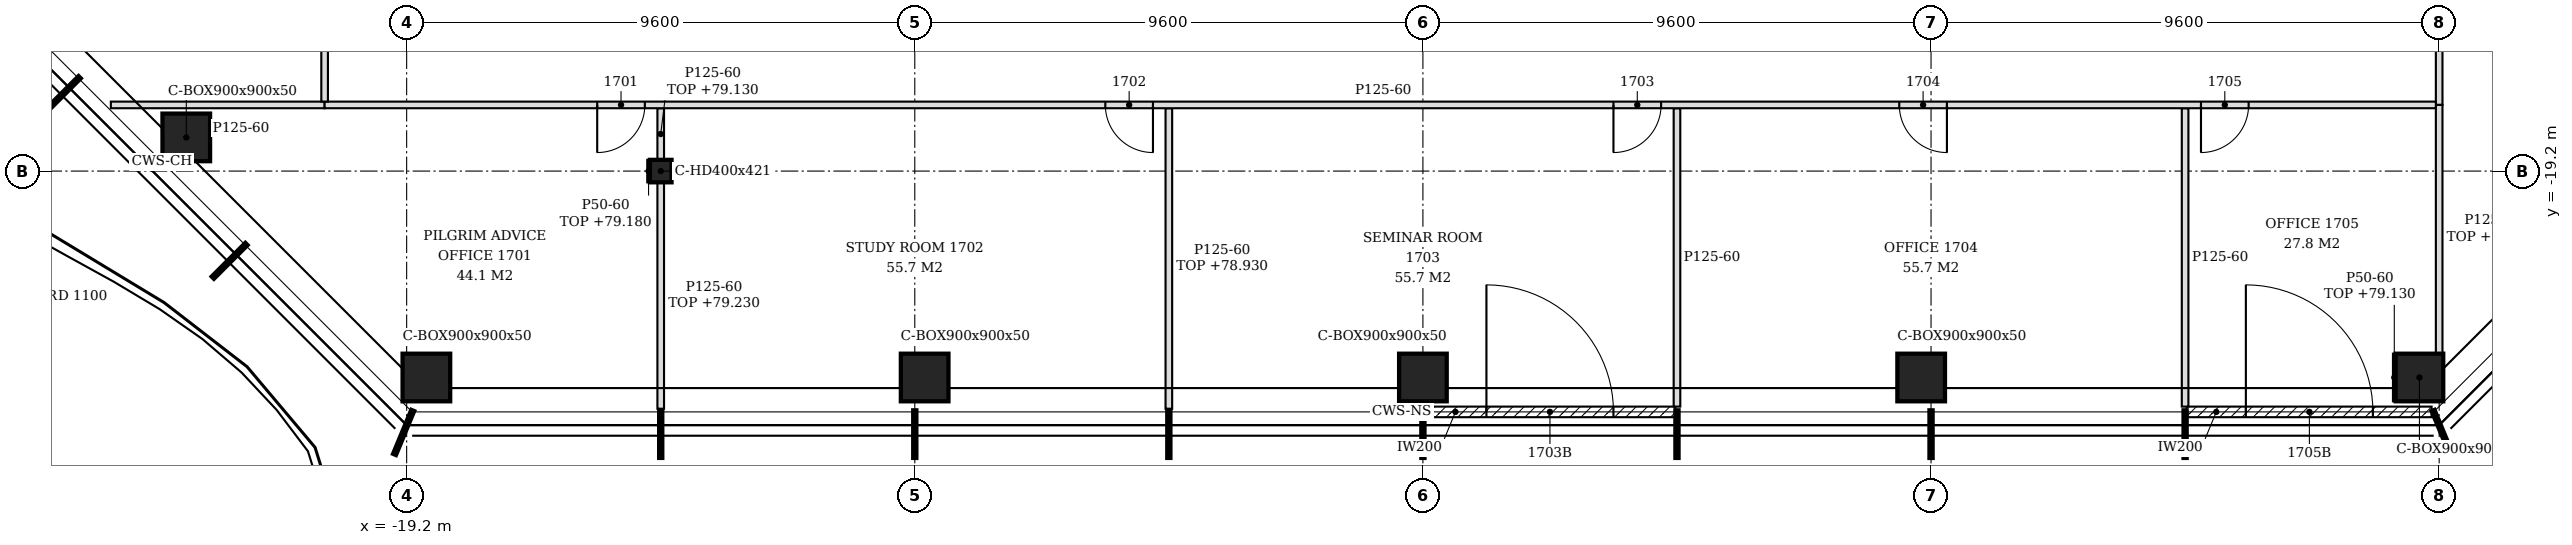
"""IFC4 building model, lengths in metres.
Left out: names, types, materials, properties, quantities, classifications, styles, units other than length and angle.
Written with IfcOpenShell. Run it as: python <this file> out.ifc"""

import sys

from ifc_helpers import new_model, si_unit, direction, frame, frame_2d, origin, origin_2d, place, context, subcontext, project, spatial, polyline, rectangle, hollow_rectangle, i_section, outline, extrude, element, fill, save


model = new_model("IFC4")
c1 = context("Model", 3, precision=1e-05, world=origin(), true_north=direction((0.0, 1.0)))
c2 = subcontext(c1, "Body", "Model", "MODEL_VIEW")
j1 = project(units=[si_unit("LENGTHUNIT", "METRE"), si_unit("PLANEANGLEUNIT", "RADIAN")], contexts=[c1])
p1 = place(None, origin())
s1 = spatial("IfcSite", under=j1, at=p1, CompositionType="ELEMENT")
p2 = place(p1, origin())
s2 = spatial("IfcBuilding", under=s1, at=p2, CompositionType="ELEMENT")
p3 = place(p2, frame((0.0, 0.0, 76.2)))
s3 = spatial("IfcBuildingStorey", under=s2, at=p3, CompositionType="ELEMENT", Elevation=76.2)
for number, where, z_axis, x_axis in (
    (1, (-18.827, -23.1, -0.15), (0.0, 0.0, 1.0), (1.0, 0.0, 0.0)),
    (2, (-9.414, -23.1, -0.15), (0.0, 0.0, 1.0), (1.0, 0.0, 0.0)),
    (3, (0.0, -23.1, -0.15), (0.0, 0.0, 1.0), (1.0, 0.0, 0.0)),
    (4, (9.414, -23.1, -0.15), (0.0, 0.0, 1.0), (1.0, 0.0, 0.0)),
    (5, (18.827, -23.1, -0.15), (0.0, 0.0, 1.0), (1.0, 0.0, 0.0)),
    (6, (-23.364, -18.564, -0.15), (0.0, 0.0, 1.0), (1.0, 0.0, 0.0)),
):
    element("IfcColumn", number, at=place(p3, frame(where, z_axis=z_axis, x_axis=x_axis)), inside=s3, PredefinedType="COLUMN", context=c2, shape_type="SweptSolid", body=[
        extrude(hollow_rectangle(XDim=0.9, YDim=0.9, WallThickness=0.05, at=origin_2d()), origin(), (0.0, 0.0, 1.0), 3.6),
    ])
p4 = place(p3, frame((-14.4, -19.2, -0.15), z_axis=(0.0, 0.0, 1.0), x_axis=(1.0, 0.0, 0.0)))
e7 = element("IfcColumn", 7, at=p4, inside=s3, PredefinedType="COLUMN", context=c2, shape_type="SweptSolid", body=[
    extrude(i_section(OverallWidth=0.409, OverallDepth=0.425, WebThickness=0.033, FlangeThickness=0.052, FilletRadius=0.015, at=origin_2d()), origin(), (0.0, 0.0, 1.0), 3.6),
])
p5 = place(p3, frame((0.03, -23.75, 0.0), z_axis=(0.0, 0.0, 1.0), x_axis=(1.0, 0.0, 0.0)))
e8 = element("IfcWall", 8, at=p5, inside=s3, PredefinedType="NOTDEFINED", context=c2, shape_type="SweptSolid", body=[
    extrude(rectangle(XDim=4.74, YDim=0.2, at=frame_2d((2.37, 0.0))), origin(), (0.0, 0.0, 1.0), 3.45),
])
p6 = place(p5, frame((1.17, 0.0, 0.0)))
e9 = element("IfcOpeningElement", 9, at=p6, cuts=e8, PredefinedType="OPENING", context=c2, shape_type="SweptSolid", body=[
    extrude(rectangle(XDim=2.4, YDim=2.4, at=frame_2d((1.2, 1.2))), frame((0.0, 0.11, 0.0), z_axis=(0.0, -1.0, 0.0), x_axis=(1.0, 0.0, 0.0)), (0.0, 0.0, 1.0), 0.22),
])
p7 = place(p3, frame((14.43, -23.75, 0.0), z_axis=(0.0, 0.0, 1.0), x_axis=(1.0, 0.0, 0.0)))
e10 = element("IfcWall", 10, at=p7, inside=s3, PredefinedType="NOTDEFINED", context=c2, shape_type="SweptSolid", body=[
    extrude(rectangle(XDim=4.626, YDim=0.2, at=frame_2d((2.313, 0.0))), origin(), (0.0, 0.0, 1.0), 3.45),
])
p8 = place(p7, frame((1.118, 0.0, 0.0)))
e11 = element("IfcOpeningElement", 11, at=p8, cuts=e10, PredefinedType="OPENING", context=c2, shape_type="SweptSolid", body=[
    extrude(rectangle(XDim=2.4, YDim=2.4, at=frame_2d((1.2, 1.2))), frame((0.0, 0.11, 0.0), z_axis=(0.0, -1.0, 0.0), x_axis=(1.0, 0.0, 0.0)), (0.0, 0.0, 1.0), 0.22),
])
p9 = place(p3, frame((-14.4, -23.69, 0.0), z_axis=(0.0, 0.0, 1.0), x_axis=(0.0, 1.0, 0.0)))
e12 = element("IfcWall", 12, at=p9, inside=s3, PredefinedType="PARTITIONING", context=c2, shape_type="SweptSolid", body=[
    extrude(outline(polyline([(0.0, 0.0), (4.277, 0.0), (4.278, 3.03), (0.74, 3.03), (0.738, 2.93), (0.44, 2.93), (0.438, 3.03), (0.0, 3.03), (0.0, 0.0)])), frame((0.0, 0.062, 0.0), z_axis=(0.0, -1.0, 0.0), x_axis=(1.0, 0.0, 0.0)), (0.0, 0.0, 1.0), 0.125),
])
p10 = place(p3, frame((-4.8, -23.69, 0.0), z_axis=(0.0, 0.0, 1.0), x_axis=(0.0, 1.0, 0.0)))
e13 = element("IfcWall", 13, at=p10, inside=s3, PredefinedType="PARTITIONING", context=c2, shape_type="SweptSolid", body=[
    extrude(rectangle(XDim=5.677, YDim=0.125, at=frame_2d((2.839, 0.0))), origin(), (0.0, 0.0, 1.0), 2.73),
])
for number, where, z_axis, x_axis in (
    (14, (4.8, -23.65, 0.0), (0.0, 0.0, 1.0), (0.0, 1.0, 0.0)),
    (15, (14.4, -23.65, 0.0), (0.0, 0.0, 1.0), (0.0, 1.0, 0.0)),
):
    element("IfcWall", number, at=place(p3, frame(where, z_axis=z_axis, x_axis=x_axis)), inside=s3, PredefinedType="PARTITIONING", context=c2, shape_type="SweptSolid", body=[
        extrude(outline(polyline([(0.0, 0.0), (5.637, 0.0), (5.637, 3.45), (4.555, 3.45), (4.553, 2.88), (4.345, 2.88), (4.343, 3.45), (0.7, 3.45), (0.698, 2.93), (0.4, 2.93), (0.398, 3.45), (0.0, 3.45), (0.0, 0.0)])), frame((0.0, 0.062, 0.0), z_axis=(0.0, -1.0, 0.0), x_axis=(1.0, 0.0, 0.0)), (0.0, 0.0, 1.0), 0.125),
    ])
p11 = place(p3, frame((19.2, -22.65, 0.0), z_axis=(0.0, 0.0, 1.0), x_axis=(0.0, 1.0, 0.0)))
e16 = element("IfcWall", 16, at=p11, inside=s3, PredefinedType="PARTITIONING", context=c2, shape_type="SweptSolid", body=[
    extrude(outline(polyline([(0.0, 0.0), (4.7, 0.0), (4.7, 2.73), (0.48, 2.73), (0.478, 2.63), (0.0, 2.63), (0.0, 0.0)])), frame((0.0, 0.062, 0.0), z_axis=(0.0, -1.0, 0.0), x_axis=(1.0, 0.0, 0.0)), (0.0, 0.0, 1.0), 0.125),
])
p12 = place(p3, frame((-14.4, -18.988, 0.0), z_axis=(0.0, 0.0, 1.0), x_axis=(0.0, 1.0, 0.0)))
e17 = element("IfcWall", 17, at=p12, inside=s3, PredefinedType="PARTITIONING", context=c2, shape_type="SweptSolid", body=[
    extrude(rectangle(XDim=0.975, YDim=0.125, at=frame_2d((0.488, 0.0))), origin(), (0.0, 0.0, 1.0), 2.93),
])
p13 = place(p3, frame((-24.789, -17.95, 0.0), z_axis=(0.0, 0.0, 1.0), x_axis=(1.0, 0.0, 0.0)))
e18 = element("IfcWall", 18, at=p13, inside=s3, PredefinedType="PARTITIONING", context=c2, shape_type="SweptSolid", body=[
    extrude(outline(polyline([(0.0, 0.0), (4.039, 0.0), (4.039, 3.45), (1.086, 3.45), (1.084, 2.93), (0.537, 2.93), (0.535, 3.45), (0.0, 3.45), (0.0, 0.0)])), frame((0.0, 0.062, 0.0), z_axis=(0.0, -1.0, 0.0), x_axis=(1.0, 0.0, 0.0)), (0.0, 0.0, 1.0), 0.125),
])
p14 = place(p3, frame((-20.75, -17.95, 0.0), z_axis=(0.0, 0.0, 1.0), x_axis=(1.0, 0.0, 0.0)))
e19 = element("IfcWall", 19, at=p14, inside=s3, PredefinedType="PARTITIONING", context=c2, shape_type="SweptSolid", body=[
    extrude(outline(polyline([(0.0, 0.0), (39.887, 0.0), (39.887, 2.73), (39.8, 2.73), (39.798, 3.45), (28.1, 3.45), (28.098, 2.73), (27.8, 2.73), (27.798, 3.45), (16.1, 3.45), (16.098, 2.73), (15.8, 2.73), (15.798, 3.45), (6.5, 3.45), (6.498, 2.93), (6.2, 2.93), (6.198, 3.45), (0.0, 3.45), (0.0, 0.0)])), frame((0.0, 0.062, 0.0), z_axis=(0.0, -1.0, 0.0), x_axis=(1.0, 0.0, 0.0)), (0.0, 0.0, 1.0), 0.125),
])
p15 = place(p14, frame((5.15, 0.0, 0.0)))
e20 = element("IfcOpeningElement", 20, at=p15, cuts=e19, PredefinedType="OPENING", context=c2, shape_type="SweptSolid", body=[
    extrude(rectangle(XDim=0.9, YDim=2.1, at=frame_2d((0.45, 1.05))), frame((0.0, 0.073, 0.0), z_axis=(0.0, -1.0, 0.0), x_axis=(1.0, 0.0, 0.0)), (0.0, 0.0, 1.0), 0.145),
])
p16 = place(p14, frame((14.75, 0.0, 0.0)))
e21 = element("IfcOpeningElement", 21, at=p16, cuts=e19, PredefinedType="OPENING", context=c2, shape_type="SweptSolid", body=[
    extrude(rectangle(XDim=0.9, YDim=2.1, at=frame_2d((0.45, 1.05))), frame((0.0, 0.073, 0.0), z_axis=(0.0, -1.0, 0.0), x_axis=(1.0, 0.0, 0.0)), (0.0, 0.0, 1.0), 0.145),
])
p17 = place(p14, frame((24.35, 0.0, 0.0)))
e22 = element("IfcOpeningElement", 22, at=p17, cuts=e19, PredefinedType="OPENING", context=c2, shape_type="SweptSolid", body=[
    extrude(rectangle(XDim=0.9, YDim=2.1, at=frame_2d((0.45, 1.05))), frame((0.0, 0.073, 0.0), z_axis=(0.0, -1.0, 0.0), x_axis=(1.0, 0.0, 0.0)), (0.0, 0.0, 1.0), 0.145),
])
p18 = place(p14, frame((29.75, 0.0, 0.0)))
e23 = element("IfcOpeningElement", 23, at=p18, cuts=e19, PredefinedType="OPENING", context=c2, shape_type="SweptSolid", body=[
    extrude(rectangle(XDim=0.9, YDim=2.1, at=frame_2d((0.45, 1.05))), frame((0.0, 0.073, 0.0), z_axis=(0.0, -1.0, 0.0), x_axis=(1.0, 0.0, 0.0)), (0.0, 0.0, 1.0), 0.145),
])
p19 = place(p14, frame((35.45, 0.0, 0.0)))
e24 = element("IfcOpeningElement", 24, at=p19, cuts=e19, PredefinedType="OPENING", context=c2, shape_type="SweptSolid", body=[
    extrude(rectangle(XDim=0.9, YDim=2.1, at=frame_2d((0.45, 1.05))), frame((0.0, 0.073, 0.0), z_axis=(0.0, -1.0, 0.0), x_axis=(1.0, 0.0, 0.0)), (0.0, 0.0, 1.0), 0.145),
])
p20 = place(p3, frame((-20.75, -17.887, 0.0), z_axis=(0.0, 0.0, 1.0), x_axis=(0.0, 1.0, 0.0)))
e25 = element("IfcWall", 25, at=p20, inside=s3, PredefinedType="PARTITIONING", context=c2, shape_type="SweptSolid", body=[
    extrude(outline(polyline([(0.0, 0.0), (39.876, 0.0), (39.876, 3.45), (39.622, 3.45), (39.62, 2.63), (38.507, 2.63), (38.505, 3.45), (37.183, 3.45), (37.18, 2.98), (36.992, 2.98), (36.99, 3.45), (32.397, 3.45), (32.396, 2.83), (32.177, 2.83), (32.176, 3.45), (27.597, 3.45), (27.595, 2.83), (27.377, 2.83), (27.375, 3.45), (22.798, 3.45), (22.795, 2.83), (22.577, 2.83), (22.575, 3.45), (17.998, 3.45), (17.996, 2.83), (17.778, 2.83), (17.775, 3.45), (13.198, 3.45), (13.196, 2.83), (12.978, 2.83), (12.976, 3.45), (8.397, 3.45), (8.396, 2.83), (8.177, 2.83), (8.176, 3.45), (3.597, 3.45), (3.595, 2.83), (3.377, 2.83), (3.375, 3.45), (0.0, 3.45), (0.0, 0.0)])), frame((0.0, 0.062, 0.0), z_axis=(0.0, -1.0, 0.0), x_axis=(1.0, 0.0, 0.0)), (0.0, 0.0, 1.0), 0.125),
])
p21 = place(p20, frame((4.738, 0.0, 0.0)))
e26 = element("IfcOpeningElement", 26, at=p21, cuts=e25, PredefinedType="OPENING", context=c2, shape_type="SweptSolid", body=[
    extrude(rectangle(XDim=0.9, YDim=2.1, at=frame_2d((0.45, 1.05))), frame((0.0, 0.073, 0.0), z_axis=(0.0, -1.0, 0.0), x_axis=(1.0, 0.0, 0.0)), (0.0, 0.0, 1.0), 0.145),
])
p22 = place(p20, frame((13.387, 0.0, 0.0)))
e27 = element("IfcOpeningElement", 27, at=p22, cuts=e25, PredefinedType="OPENING", context=c2, shape_type="SweptSolid", body=[
    extrude(rectangle(XDim=0.9, YDim=2.1, at=frame_2d((0.45, 1.05))), frame((0.0, 0.073, 0.0), z_axis=(0.0, -1.0, 0.0), x_axis=(1.0, 0.0, 0.0)), (0.0, 0.0, 1.0), 0.145),
])
p23 = place(p20, frame((20.988, 0.0, 0.0)))
e28 = element("IfcOpeningElement", 28, at=p23, cuts=e25, PredefinedType="OPENING", context=c2, shape_type="SweptSolid", body=[
    extrude(rectangle(XDim=0.9, YDim=2.1, at=frame_2d((0.45, 1.05))), frame((0.0, 0.073, 0.0), z_axis=(0.0, -1.0, 0.0), x_axis=(1.0, 0.0, 0.0)), (0.0, 0.0, 1.0), 0.145),
])
p24 = place(p20, frame((31.387, 0.0, 0.0)))
e29 = element("IfcOpeningElement", 29, at=p24, cuts=e25, PredefinedType="OPENING", context=c2, shape_type="SweptSolid", body=[
    extrude(rectangle(XDim=0.9, YDim=2.1, at=frame_2d((0.45, 1.05))), frame((0.0, 0.073, 0.0), z_axis=(0.0, -1.0, 0.0), x_axis=(1.0, 0.0, 0.0)), (0.0, 0.0, 1.0), 0.145),
])
p25 = place(p3, frame((19.2, -17.95, 0.0), z_axis=(0.0, 0.0, 1.0), x_axis=(0.0, 1.0, 0.0)))
e30 = element("IfcWall", 30, at=p25, inside=s3, PredefinedType="PARTITIONING", context=c2, shape_type="SweptSolid", body=[
    extrude(rectangle(XDim=9.313, YDim=0.125, at=frame_2d((4.656, 0.0))), origin(), (0.0, 0.0, 1.0), 2.73),
])
p26 = place(p25, frame((7.65, 0.0, 0.0)))
e31 = element("IfcOpeningElement", 31, at=p26, cuts=e30, PredefinedType="OPENING", context=c2, shape_type="SweptSolid", body=[
    extrude(rectangle(XDim=0.9, YDim=2.1, at=frame_2d((0.45, 1.05))), frame((0.0, 0.073, 0.0), z_axis=(0.0, -1.0, 0.0), x_axis=(1.0, 0.0, 0.0)), (0.0, 0.0, 1.0), 0.145),
])
p27 = place(p3, frame((-14.629, -19.413, 0.0), z_axis=(0.0, 0.0, 1.0), x_axis=(0.0, 1.0, 0.0)))
e32 = element("IfcWall", 32, at=p27, inside=s3, PredefinedType="PARTITIONING", context=c2, shape_type="SweptSolid", body=[
    extrude(rectangle(XDim=0.425, YDim=0.05, at=frame_2d((0.212, 0.0))), origin(), (0.0, 0.0, 1.0), 2.98),
])
p28 = place(p3, frame((18.352, -23.55, 0.0), z_axis=(0.0, 0.0, 1.0), x_axis=(0.0, 1.0, 0.0)))
e33 = element("IfcWall", 33, at=p28, inside=s3, PredefinedType="PARTITIONING", context=c2, shape_type="SweptSolid", body=[
    extrude(rectangle(XDim=0.9, YDim=0.05, at=frame_2d((0.45, 0.0))), origin(), (0.0, 0.0, 1.0), 2.93),
])
p29 = place(p6, origin())
e34 = element("IfcDoor", 34, at=p29, inside=s3, OperationType="SINGLE_SWING_LEFT", PredefinedType="DOOR", context=c2, shape_type="SweptSolid", body=[
    extrude(rectangle(XDim=2.4, YDim=2.4, at=frame_2d((1.2, 1.2))), frame((0.0, 0.025, 0.0), z_axis=(0.0, -1.0, 0.0), x_axis=(1.0, 0.0, 0.0)), (0.0, 0.0, 1.0), 0.05),
])
fill(e9, e34)
p30 = place(p8, origin())
e35 = element("IfcDoor", 35, at=p30, inside=s3, OperationType="SINGLE_SWING_LEFT", PredefinedType="DOOR", context=c2, shape_type="SweptSolid", body=[
    extrude(rectangle(XDim=2.4, YDim=2.4, at=frame_2d((1.2, 1.2))), frame((0.0, 0.025, 0.0), z_axis=(0.0, -1.0, 0.0), x_axis=(1.0, 0.0, 0.0)), (0.0, 0.0, 1.0), 0.05),
])
fill(e11, e35)
p31 = place(p15, frame((0.9, 0.0, 0.0), z_axis=(0.0, 0.0, 1.0), x_axis=(-1.0, 0.0, 0.0)))
e36 = element("IfcDoor", 36, at=p31, inside=s3, OperationType="SINGLE_SWING_RIGHT", PredefinedType="DOOR", context=c2, shape_type="SweptSolid", body=[
    extrude(rectangle(XDim=0.9, YDim=2.1, at=frame_2d((0.45, 1.05))), frame((0.0, 0.025, 0.0), z_axis=(0.0, -1.0, 0.0), x_axis=(1.0, 0.0, 0.0)), (0.0, 0.0, 1.0), 0.05),
])
fill(e20, e36)
p32 = place(p16, frame((0.9, 0.0, 0.0), z_axis=(0.0, 0.0, 1.0), x_axis=(-1.0, 0.0, 0.0)))
e37 = element("IfcDoor", 37, at=p32, inside=s3, OperationType="SINGLE_SWING_LEFT", PredefinedType="DOOR", context=c2, shape_type="SweptSolid", body=[
    extrude(rectangle(XDim=0.9, YDim=2.1, at=frame_2d((0.45, 1.05))), frame((0.0, 0.025, 0.0), z_axis=(0.0, -1.0, 0.0), x_axis=(1.0, 0.0, 0.0)), (0.0, 0.0, 1.0), 0.05),
])
fill(e21, e37)
p33 = place(p17, frame((0.9, 0.0, 0.0), z_axis=(0.0, 0.0, 1.0), x_axis=(-1.0, 0.0, 0.0)))
e38 = element("IfcDoor", 38, at=p33, inside=s3, OperationType="SINGLE_SWING_RIGHT", PredefinedType="DOOR", context=c2, shape_type="SweptSolid", body=[
    extrude(rectangle(XDim=0.9, YDim=2.1, at=frame_2d((0.45, 1.05))), frame((0.0, 0.025, 0.0), z_axis=(0.0, -1.0, 0.0), x_axis=(1.0, 0.0, 0.0)), (0.0, 0.0, 1.0), 0.05),
])
fill(e22, e38)
p34 = place(p18, frame((0.9, 0.0, 0.0), z_axis=(0.0, 0.0, 1.0), x_axis=(-1.0, 0.0, 0.0)))
e39 = element("IfcDoor", 39, at=p34, inside=s3, OperationType="SINGLE_SWING_LEFT", PredefinedType="DOOR", context=c2, shape_type="SweptSolid", body=[
    extrude(rectangle(XDim=0.9, YDim=2.1, at=frame_2d((0.45, 1.05))), frame((0.0, 0.025, 0.0), z_axis=(0.0, -1.0, 0.0), x_axis=(1.0, 0.0, 0.0)), (0.0, 0.0, 1.0), 0.05),
])
fill(e23, e39)
p35 = place(p19, frame((0.9, 0.0, 0.0), z_axis=(0.0, 0.0, 1.0), x_axis=(-1.0, 0.0, 0.0)))
e40 = element("IfcDoor", 40, at=p35, inside=s3, OperationType="SINGLE_SWING_RIGHT", PredefinedType="DOOR", context=c2, shape_type="SweptSolid", body=[
    extrude(rectangle(XDim=0.9, YDim=2.1, at=frame_2d((0.45, 1.05))), frame((0.0, 0.025, 0.0), z_axis=(0.0, -1.0, 0.0), x_axis=(1.0, 0.0, 0.0)), (0.0, 0.0, 1.0), 0.05),
])
fill(e24, e40)
save(model, sys.argv[1])
